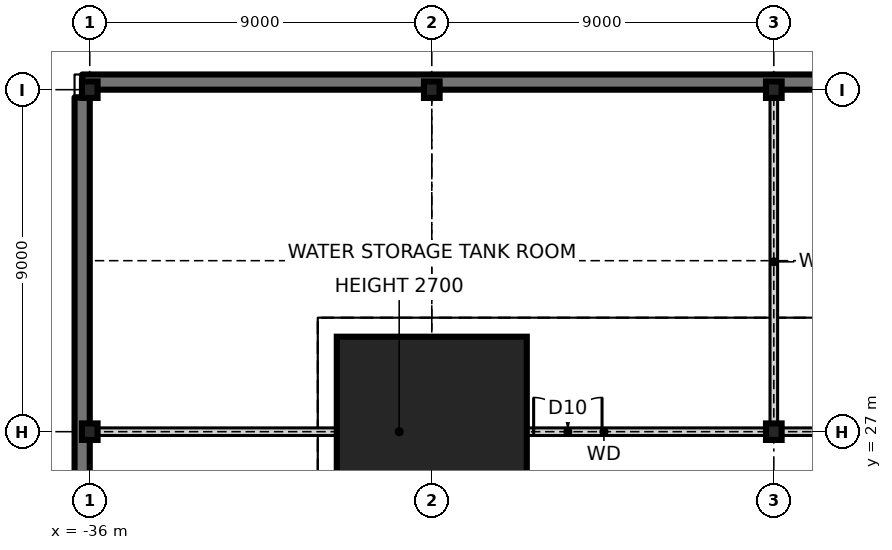
"""IFC4 building model, lengths in metres.
Left out: names, types, materials, properties, quantities, classifications, styles, units other than length and angle.
Written with IfcOpenShell. Run it as: python <this file> out.ifc"""

import sys

from ifc_helpers import new_model, si_unit, direction, frame, frame_2d, origin, origin_2d, place, context, subcontext, project, spatial, rectangle, i_section, extrude, element, fill, save


model = new_model("IFC4")
c1 = context("Model", 3, precision=1e-05, world=origin(), true_north=direction((0.0, 1.0)))
c2 = subcontext(c1, "Body", "Model", "MODEL_VIEW")
j1 = project(units=[si_unit("LENGTHUNIT", "METRE"), si_unit("PLANEANGLEUNIT", "RADIAN")], contexts=[c1])
p1 = place(None, origin())
s1 = spatial("IfcSite", under=j1, at=p1, CompositionType="ELEMENT")
p2 = place(p1, origin())
s2 = spatial("IfcBuilding", under=s1, at=p2, CompositionType="ELEMENT")
p3 = place(p2, frame((0.0, 0.0, -7.2)))
s3 = spatial("IfcBuildingStorey", under=s2, at=p3, CompositionType="ELEMENT", Elevation=-7.2)
p4 = place(p3, frame((-27.0, 27.0, -1.8), z_axis=(0.0, 0.0, 1.0), x_axis=(1.0, 0.0, 0.0)))
e1 = element("IfcColumn", 1, at=p4, inside=s3, PredefinedType="COLUMN", context=c2, shape_type="SweptSolid", body=[
    extrude(rectangle(XDim=5.0, YDim=5.0, at=origin_2d()), origin(), (0.0, 0.0, 1.0), 5.4),
    extrude(i_section(OverallWidth=0.478, OverallDepth=0.599, WebThickness=0.1, FlangeThickness=0.14, at=origin_2d()), origin(), (0.0, 0.0, 1.0), 5.4),
])
for number, where, z_axis, x_axis in (
    (2, (-36.0, 27.0, -0.25), (0.0, 0.0, 1.0), (1.0, 0.0, 0.0)),
    (3, (-36.0, 36.0, -0.25), (0.0, 0.0, 1.0), (1.0, 0.0, 0.0)),
    (4, (-27.0, 36.0, -0.25), (0.0, 0.0, 1.0), (1.0, 0.0, 0.0)),
):
    element("IfcColumn", number, at=place(p3, frame(where, z_axis=z_axis, x_axis=x_axis)), inside=s3, PredefinedType="COLUMN", context=c2, shape_type="SweptSolid", body=[
        extrude(i_section(OverallWidth=0.411, OverallDepth=0.434, WebThickness=0.036, FlangeThickness=0.057, at=origin_2d()), origin(), (0.0, 0.0, 1.0), 3.85),
    ])
p5 = place(p3, frame((-18.0, 27.0, -1.8), z_axis=(0.0, 0.0, 1.0), x_axis=(1.0, 0.0, 0.0)))
e5 = element("IfcColumn", 5, at=p5, inside=s3, PredefinedType="COLUMN", context=c2, shape_type="SweptSolid", body=[
    extrude(i_section(OverallWidth=0.411, OverallDepth=0.434, WebThickness=0.036, FlangeThickness=0.057, at=origin_2d()), origin(), (0.0, 0.0, 1.0), 5.4),
])
p6 = place(p3, frame((-18.0, 36.0, -0.25), z_axis=(0.0, 0.0, 1.0), x_axis=(1.0, 0.0, 0.0)))
e6 = element("IfcColumn", 6, at=p6, inside=s3, PredefinedType="COLUMN", context=c2, shape_type="SweptSolid", body=[
    extrude(i_section(OverallWidth=0.411, OverallDepth=0.434, WebThickness=0.036, FlangeThickness=0.057, at=origin_2d()), origin(), (0.0, 0.0, 1.0), 3.85),
])
p7 = place(p3, frame((30.0, 29.775, -1.8), z_axis=(0.0, 0.0, 1.0), x_axis=(-1.0, 0.0, 0.0)))
e7 = element("IfcWall", 7, at=p7, inside=s3, PredefinedType="SOLIDWALL", context=c2, shape_type="SweptSolid", body=[
    extrude(rectangle(XDim=60.0, YDim=0.45, at=frame_2d((30.0, 0.0))), origin(), (0.0, 0.0, 1.0), 1.5),
])
p8 = place(p3, frame((-29.775, 29.55, -1.8), z_axis=(0.0, 0.0, 1.0), x_axis=(0.0, -1.0, 0.0)))
e8 = element("IfcWall", 8, at=p8, inside=s3, PredefinedType="SOLIDWALL", context=c2, shape_type="SweptSolid", body=[
    extrude(rectangle(XDim=59.1, YDim=0.45, at=frame_2d((29.55, 0.0))), origin(), (0.0, 0.0, 1.0), 1.5),
])
p9 = place(p3, frame((-24.5, 27.0, -1.8), z_axis=(0.0, 0.0, 1.0), x_axis=(1.0, 0.0, 0.0)))
e9 = element("IfcWall", 9, at=p9, inside=s3, PredefinedType="SOLIDWALL", context=c2, shape_type="SweptSolid", body=[
    extrude(rectangle(XDim=49.0, YDim=0.45, at=frame_2d((24.5, 0.0))), origin(), (0.0, 0.0, 1.0), 1.5),
])
p10 = place(p3, frame((-18.0, 18.225, -1.8), z_axis=(0.0, 0.0, 1.0), x_axis=(0.0, 1.0, 0.0)))
e10 = element("IfcWall", 10, at=p10, inside=s3, PredefinedType="SOLIDWALL", context=c2, shape_type="SweptSolid", body=[
    extrude(rectangle(XDim=8.55, YDim=0.45, at=frame_2d((4.275, 0.0))), origin(), (0.0, 0.0, 1.0), 1.5),
])
p11 = place(p3, frame((-18.0, 27.225, -1.8), z_axis=(0.0, 0.0, 1.0), x_axis=(0.0, 1.0, 0.0)))
e11 = element("IfcWall", 11, at=p11, inside=s3, PredefinedType="SOLIDWALL", context=c2, shape_type="SweptSolid", body=[
    extrude(rectangle(XDim=2.325, YDim=0.45, at=frame_2d((1.163, 0.0))), origin(), (0.0, 0.0, 1.0), 1.5),
])
p12 = place(p3, frame((90.2, 36.2, 0.0), z_axis=(0.0, 0.0, 1.0), x_axis=(-1.0, 0.0, 0.0)))
e12 = element("IfcWall", 12, at=p12, inside=s3, PredefinedType="SOLIDWALL", context=c2, shape_type="SweptSolid", body=[
    extrude(rectangle(XDim=126.4, YDim=0.4, at=frame_2d((63.2, 0.0))), origin(), (0.0, 0.0, 1.0), 3.6),
])
p13 = place(p3, frame((-36.2, 35.8, 0.0), z_axis=(0.0, 0.0, 1.0), x_axis=(0.0, -1.0, 0.0)))
e13 = element("IfcWall", 13, at=p13, inside=s3, PredefinedType="SOLIDWALL", context=c2, shape_type="SweptSolid", body=[
    extrude(rectangle(XDim=71.6, YDim=0.4, at=frame_2d((35.8, 0.0))), origin(), (0.0, 0.0, 1.0), 3.6),
])
p14 = place(p3, frame((-35.94, 27.0, -0.25), z_axis=(0.0, 0.0, 1.0), x_axis=(1.0, 0.0, 0.0)))
e14 = element("IfcWall", 14, at=p14, inside=s3, PredefinedType="SOLIDWALL", context=c2, shape_type="SweptSolid", body=[
    extrude(rectangle(XDim=26.94, YDim=0.2, at=frame_2d((13.47, 0.0))), origin(), (0.0, 0.0, 1.0), 2.7),
])
p15 = place(p14, frame((11.62, 0.0, 0.25)))
e15 = element("IfcOpeningElement", 15, at=p15, cuts=e14, PredefinedType="OPENING", context=c2, shape_type="SweptSolid", body=[
    extrude(rectangle(XDim=1.8, YDim=2.4, at=frame_2d((0.9, 1.2))), frame((0.0, 0.11, 0.0), z_axis=(0.0, -1.0, 0.0), x_axis=(1.0, 0.0, 0.0)), (0.0, 0.0, 1.0), 0.22),
])
p16 = place(p3, frame((-18.0, 27.0, -0.25), z_axis=(0.0, 0.0, 1.0), x_axis=(0.0, 1.0, 0.0)))
e16 = element("IfcWall", 16, at=p16, inside=s3, PredefinedType="SOLIDWALL", context=c2, shape_type="SweptSolid", body=[
    extrude(rectangle(XDim=8.94, YDim=0.2, at=frame_2d((4.47, 0.0))), origin(), (0.0, 0.0, 1.0), 2.83),
])
p17 = place(p15, origin())
e17 = element("IfcDoor", 17, at=p17, inside=s3, OperationType="DOUBLE_DOOR_SINGLE_SWING", PredefinedType="DOOR", context=c2, shape_type="SweptSolid", body=[
    extrude(rectangle(XDim=1.8, YDim=2.4, at=frame_2d((0.9, 1.2))), frame((0.0, 0.025, 0.0), z_axis=(0.0, -1.0, 0.0), x_axis=(1.0, 0.0, 0.0)), (0.0, 0.0, 1.0), 0.05),
])
fill(e15, e17)
save(model, sys.argv[1])
